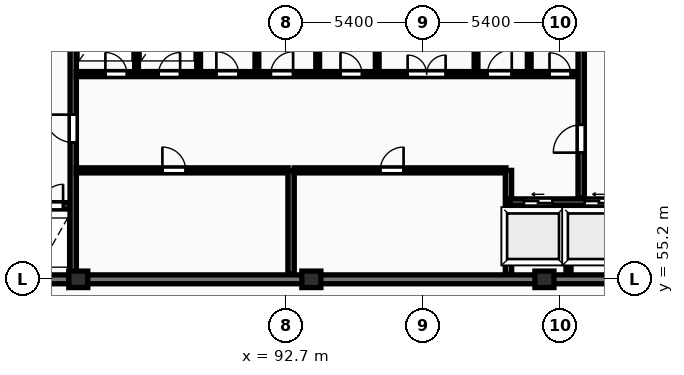
"""IFC4 building model, lengths in metres.
Left out: names, types, materials, properties, quantities, classifications, styles, units other than length and angle.
Written with IfcOpenShell. Run it as: python <this file> out.ifc"""

import sys

from ifc_helpers import new_model, si_unit, direction, frame, frame_2d, origin, origin_2d, place, context, subcontext, project, spatial, rectangle, extrude, element, fill, save


model = new_model("IFC4")
c1 = context("Model", 3, precision=1e-05, world=origin(), true_north=direction((0.0, 1.0)))
c2 = subcontext(c1, "Body", "Model", "MODEL_VIEW")
j1 = project(units=[si_unit("LENGTHUNIT", "METRE"), si_unit("PLANEANGLEUNIT", "RADIAN")], contexts=[c1])
p1 = place(None, origin())
s1 = spatial("IfcSite", under=j1, at=p1, CompositionType="ELEMENT")
p2 = place(p1, origin())
s2 = spatial("IfcBuilding", under=s1, at=p2, CompositionType="ELEMENT")
p3 = place(p2, frame((0.0, 0.0, 242.45)))
s3 = spatial("IfcBuildingStorey", under=s2, at=p3, CompositionType="ELEMENT", Elevation=242.45)
for number, where, z_axis, x_axis in (
    (1, (84.5, 55.2, 0.0), (0.0, 0.0, 1.0), (1.0, 0.0, 0.0)),
    (2, (93.7, 55.2, 0.0), (0.0, 0.0, 1.0), (1.0, 0.0, 0.0)),
    (3, (102.9, 55.2, 0.0), (0.0, 0.0, 1.0), (1.0, 0.0, 0.0)),
):
    element("IfcColumn", number, at=place(p3, frame(where, z_axis=z_axis, x_axis=x_axis)), inside=s3, PredefinedType="COLUMN", context=c2, shape_type="SweptSolid", body=[
        extrude(rectangle(XDim=0.75, YDim=0.65, at=origin_2d()), origin(), (0.0, 0.0, 1.0), 3.45),
    ])
p4 = place(p3, frame((75.95, 55.2, 0.0), z_axis=(0.0, 0.0, 1.0), x_axis=(1.0, 0.0, 0.0)))
e4 = element("IfcWall", 4, at=p4, inside=s3, PredefinedType="SHEAR", context=c2, shape_type="SweptSolid", body=[
    extrude(rectangle(XDim=36.3, YDim=0.35, at=frame_2d((18.15, 0.0))), origin(), (0.0, 0.0, 1.0), 3.45),
])
p5 = place(p3, frame((79.79, 58.1, 0.0), z_axis=(0.0, 0.0, 1.0), x_axis=(1.0, 0.0, 0.0)))
e5 = element("IfcWall", 5, at=p5, inside=s3, PredefinedType="SHEAR", context=c2, shape_type="SweptSolid", body=[
    extrude(rectangle(XDim=4.39, YDim=0.25, at=frame_2d((2.195, 0.0))), origin(), (0.0, 0.0, 1.0), 3.45),
])
p6 = place(p5, frame((1.05, 0.0, 0.0)))
e6 = element("IfcOpeningElement", 6, at=p6, cuts=e5, PredefinedType="OPENING", context=c2, shape_type="SweptSolid", body=[
    extrude(rectangle(XDim=1.12, YDim=2.12, at=frame_2d((0.56, 1.06))), frame((0.0, 0.135, 0.0), z_axis=(0.0, -1.0, 0.0), x_axis=(1.0, 0.0, 0.0)), (0.0, 0.0, 1.0), 0.27),
])
p7 = place(p5, frame((3.26, 0.0, 0.0)))
e7 = element("IfcOpeningElement", 7, at=p7, cuts=e5, PredefinedType="OPENING", context=c2, shape_type="SweptSolid", body=[
    extrude(rectangle(XDim=0.85, YDim=2.05, at=frame_2d((0.425, 1.025))), frame((0.0, 0.135, 0.0), z_axis=(0.0, -1.0, 0.0), x_axis=(1.0, 0.0, 0.0)), (0.0, 0.0, 1.0), 0.27),
])
p8 = place(p3, frame((84.3, 55.4, 0.0), z_axis=(0.0, 0.0, 1.0), x_axis=(0.0, 1.0, 0.0)))
e8 = element("IfcWall", 8, at=p8, inside=s3, PredefinedType="SHEAR", context=c2, shape_type="SweptSolid", body=[
    extrude(rectangle(XDim=11.6, YDim=0.25, at=frame_2d((5.8, 0.0))), origin(), (0.0, 0.0, 1.0), 3.45),
])
p9 = place(p8, frame((5.2, 0.0, 0.0)))
e9 = element("IfcOpeningElement", 9, at=p9, cuts=e8, PredefinedType="OPENING", context=c2, shape_type="SweptSolid", body=[
    extrude(rectangle(XDim=1.1, YDim=2.1, at=frame_2d((0.55, 1.05))), frame((0.0, 0.135, 0.0), z_axis=(0.0, -1.0, 0.0), x_axis=(1.0, 0.0, 0.0)), (0.0, 0.0, 1.0), 0.27),
])
p10 = place(p3, frame((84.42, 59.5, 0.0), z_axis=(0.0, 0.0, 1.0), x_axis=(1.0, 0.0, 0.0)))
e10 = element("IfcWall", 10, at=p10, inside=s3, PredefinedType="PARTITIONING", context=c2, shape_type="SweptSolid", body=[
    extrude(rectangle(XDim=8.36, YDim=0.2, at=frame_2d((4.18, 0.0))), origin(), (0.0, 0.0, 1.0), 3.17),
])
p11 = place(p10, frame((3.4, 0.0, 0.0)))
e11 = element("IfcOpeningElement", 11, at=p11, cuts=e10, PredefinedType="OPENING", context=c2, shape_type="SweptSolid", body=[
    extrude(rectangle(XDim=0.92, YDim=2.08, at=frame_2d((0.46, 1.04))), frame((0.0, 0.11, 0.0), z_axis=(0.0, -1.0, 0.0), x_axis=(1.0, 0.0, 0.0)), (0.0, 0.0, 1.0), 0.22),
])
p12 = place(p3, frame((92.9, 55.4, 0.0), z_axis=(0.0, 0.0, 1.0), x_axis=(0.0, 1.0, 0.0)))
e12 = element("IfcWall", 12, at=p12, inside=s3, PredefinedType="SHEAR", context=c2, shape_type="SweptSolid", body=[
    extrude(rectangle(XDim=4.1, YDim=0.25, at=frame_2d((2.05, 0.0))), origin(), (0.0, 0.0, 1.0), 3.45),
])
p13 = place(p3, frame((93.02, 59.5, 0.0), z_axis=(0.0, 0.0, 1.0), x_axis=(1.0, 0.0, 0.0)))
e13 = element("IfcWall", 13, at=p13, inside=s3, PredefinedType="PARTITIONING", context=c2, shape_type="SweptSolid", body=[
    extrude(rectangle(XDim=8.36, YDim=0.2, at=frame_2d((4.18, 0.0))), origin(), (0.0, 0.0, 1.0), 3.17),
])
p14 = place(p13, frame((3.4, 0.0, 0.0)))
e14 = element("IfcOpeningElement", 14, at=p14, cuts=e13, PredefinedType="OPENING", context=c2, shape_type="SweptSolid", body=[
    extrude(rectangle(XDim=0.92, YDim=2.08, at=frame_2d((0.46, 1.04))), frame((0.0, 0.11, 0.0), z_axis=(0.0, -1.0, 0.0), x_axis=(1.0, 0.0, 0.0)), (0.0, 0.0, 1.0), 0.22),
])
p15 = place(p3, frame((101.48, 55.4, 0.0), z_axis=(0.0, 0.0, 1.0), x_axis=(0.0, 1.0, 0.0)))
e15 = element("IfcWall", 15, at=p15, inside=s3, PredefinedType="SHEAR", context=c2, shape_type="SweptSolid", body=[
    extrude(rectangle(XDim=4.1, YDim=0.25, at=frame_2d((2.05, 0.0))), origin(), (0.0, 0.0, 1.0), 3.45),
])
p16 = place(p3, frame((103.85, 55.4, 0.0), z_axis=(0.0, 0.0, 1.0), x_axis=(0.0, 1.0, 0.0)))
e16 = element("IfcWall", 16, at=p16, inside=s3, PredefinedType="PARTITIONING", context=c2, shape_type="SweptSolid", body=[
    extrude(rectangle(XDim=2.72, YDim=0.2, at=frame_2d((1.36, 0.0))), origin(), (0.0, 0.0, 1.0), 3.17),
])
p17 = place(p3, frame((101.55, 58.25, 0.0), z_axis=(0.0, 0.0, 1.0), x_axis=(1.0, 0.0, 0.0)))
e17 = element("IfcWall", 17, at=p17, inside=s3, PredefinedType="SHEAR", context=c2, shape_type="SweptSolid", body=[
    extrude(rectangle(XDim=4.6, YDim=0.25, at=frame_2d((2.3, 0.0))), origin(), (0.0, 0.0, 1.0), 3.45),
])
p18 = place(p17, frame((0.54, 0.0, 0.0)))
e18 = element("IfcOpeningElement", 18, at=p18, cuts=e17, PredefinedType="OPENING", context=c2, shape_type="SweptSolid", body=[
    extrude(rectangle(XDim=1.12, YDim=2.12, at=frame_2d((0.56, 1.06))), frame((0.0, 0.135, 0.0), z_axis=(0.0, -1.0, 0.0), x_axis=(1.0, 0.0, 0.0)), (0.0, 0.0, 1.0), 0.27),
])
p19 = place(p17, frame((2.94, 0.0, 0.0)))
e19 = element("IfcOpeningElement", 19, at=p19, cuts=e17, PredefinedType="OPENING", context=c2, shape_type="SweptSolid", body=[
    extrude(rectangle(XDim=1.12, YDim=2.12, at=frame_2d((0.56, 1.06))), frame((0.0, 0.135, 0.0), z_axis=(0.0, -1.0, 0.0), x_axis=(1.0, 0.0, 0.0)), (0.0, 0.0, 1.0), 0.27),
])
for number, where, z_axis, x_axis in (
    (20, (86.8, 63.4, 0.0), (0.0, 0.0, 1.0), (0.0, 1.0, 0.0)),
    (21, (89.25, 63.4, 0.0), (0.0, 0.0, 1.0), (0.0, 1.0, 0.0)),
    (22, (91.55, 63.4, 0.0), (0.0, 0.0, 1.0), (0.0, 1.0, 0.0)),
):
    element("IfcWall", number, at=place(p3, frame(where, z_axis=z_axis, x_axis=x_axis)), inside=s3, PredefinedType="PARTITIONING", context=c2, shape_type="SweptSolid", body=[
        extrude(rectangle(XDim=3.6, YDim=0.15, at=frame_2d((1.8, 0.0))), origin(), (0.0, 0.0, 1.0), 3.17),
    ])
p20 = place(p3, frame((93.95, 63.4, 0.0), z_axis=(0.0, 0.0, 1.0), x_axis=(0.0, 1.0, 0.0)))
e23 = element("IfcWall", 23, at=p20, inside=s3, PredefinedType="PARTITIONING", context=c2, shape_type="SweptSolid", body=[
    extrude(rectangle(XDim=3.6, YDim=0.15, at=frame_2d((1.8, 0.0))), origin(), (0.0, 0.0, 1.0), 2.477),
])
for number, where, z_axis, x_axis in (
    (24, (102.3, 63.4, 0.0), (0.0, 0.0, 1.0), (0.0, 1.0, 0.0)),
    (25, (96.3, 63.4, 0.0), (0.0, 0.0, 1.0), (0.0, 1.0, 0.0)),
    (26, (100.2, 63.4, 0.0), (0.0, 0.0, 1.0), (0.0, 1.0, 0.0)),
):
    element("IfcWall", number, at=place(p3, frame(where, z_axis=z_axis, x_axis=x_axis)), inside=s3, PredefinedType="PARTITIONING", context=c2, shape_type="SweptSolid", body=[
        extrude(rectangle(XDim=3.6, YDim=0.15, at=frame_2d((1.8, 0.0))), origin(), (0.0, 0.0, 1.0), 3.17),
    ])
p21 = place(p3, frame((84.42, 63.3, 0.0), z_axis=(0.0, 0.0, 1.0), x_axis=(1.0, 0.0, 0.0)))
e27 = element("IfcWall", 27, at=p21, inside=s3, PredefinedType="PARTITIONING", context=c2, shape_type="SweptSolid", body=[
    extrude(rectangle(XDim=19.83, YDim=0.2, at=frame_2d((9.915, 0.0))), origin(), (0.0, 0.0, 1.0), 3.17),
])
p22 = place(p21, frame((1.15, 0.0, 0.0)))
e28 = element("IfcOpeningElement", 28, at=p22, cuts=e27, PredefinedType="OPENING", context=c2, shape_type="SweptSolid", body=[
    extrude(rectangle(XDim=0.85, YDim=2.05, at=frame_2d((0.425, 1.025))), frame((0.0, 0.11, 0.0), z_axis=(0.0, -1.0, 0.0), x_axis=(1.0, 0.0, 0.0)), (0.0, 0.0, 1.0), 0.22),
])
p23 = place(p21, frame((3.25, 0.0, 0.0)))
e29 = element("IfcOpeningElement", 29, at=p23, cuts=e27, PredefinedType="OPENING", context=c2, shape_type="SweptSolid", body=[
    extrude(rectangle(XDim=0.85, YDim=2.05, at=frame_2d((0.425, 1.025))), frame((0.0, 0.11, 0.0), z_axis=(0.0, -1.0, 0.0), x_axis=(1.0, 0.0, 0.0)), (0.0, 0.0, 1.0), 0.22),
])
p24 = place(p21, frame((13.08, 0.0, 0.0)))
e30 = element("IfcOpeningElement", 30, at=p24, cuts=e27, PredefinedType="OPENING", context=c2, shape_type="SweptSolid", body=[
    extrude(rectangle(XDim=1.5, YDim=2.2, at=frame_2d((0.75, 1.1))), frame((0.0, 0.11, 0.0), z_axis=(0.0, -1.0, 0.0), x_axis=(1.0, 0.0, 0.0)), (0.0, 0.0, 1.0), 0.22),
])
p25 = place(p21, frame((5.53, 0.0, 0.0)))
e31 = element("IfcOpeningElement", 31, at=p25, cuts=e27, PredefinedType="OPENING", context=c2, shape_type="SweptSolid", body=[
    extrude(rectangle(XDim=0.88, YDim=2.06, at=frame_2d((0.44, 1.03))), frame((0.0, 0.11, 0.0), z_axis=(0.0, -1.0, 0.0), x_axis=(1.0, 0.0, 0.0)), (0.0, 0.0, 1.0), 0.22),
])
p26 = place(p21, frame((7.68, 0.0, 0.0)))
e32 = element("IfcOpeningElement", 32, at=p26, cuts=e27, PredefinedType="OPENING", context=c2, shape_type="SweptSolid", body=[
    extrude(rectangle(XDim=0.88, YDim=2.06, at=frame_2d((0.44, 1.03))), frame((0.0, 0.11, 0.0), z_axis=(0.0, -1.0, 0.0), x_axis=(1.0, 0.0, 0.0)), (0.0, 0.0, 1.0), 0.22),
])
p27 = place(p21, frame((10.43, 0.0, 0.0)))
e33 = element("IfcOpeningElement", 33, at=p27, cuts=e27, PredefinedType="OPENING", context=c2, shape_type="SweptSolid", body=[
    extrude(rectangle(XDim=0.85, YDim=2.05, at=frame_2d((0.425, 1.025))), frame((0.0, 0.11, 0.0), z_axis=(0.0, -1.0, 0.0), x_axis=(1.0, 0.0, 0.0)), (0.0, 0.0, 1.0), 0.22),
])
p28 = place(p21, frame((16.23, 0.0, 0.0)))
e34 = element("IfcOpeningElement", 34, at=p28, cuts=e27, PredefinedType="OPENING", context=c2, shape_type="SweptSolid", body=[
    extrude(rectangle(XDim=0.96, YDim=2.1, at=frame_2d((0.48, 1.05))), frame((0.0, 0.11, 0.0), z_axis=(0.0, -1.0, 0.0), x_axis=(1.0, 0.0, 0.0)), (0.0, 0.0, 1.0), 0.22),
])
p29 = place(p21, frame((18.68, 0.0, 0.0)))
e35 = element("IfcOpeningElement", 35, at=p29, cuts=e27, PredefinedType="OPENING", context=c2, shape_type="SweptSolid", body=[
    extrude(rectangle(XDim=0.84, YDim=2.04, at=frame_2d((0.42, 1.02))), frame((0.0, 0.11, 0.0), z_axis=(0.0, -1.0, 0.0), x_axis=(1.0, 0.0, 0.0)), (0.0, 0.0, 1.0), 0.22),
])
p30 = place(p3, frame((104.35, 58.4, 0.0), z_axis=(0.0, 0.0, 1.0), x_axis=(0.0, 1.0, 0.0)))
e36 = element("IfcWall", 36, at=p30, inside=s3, PredefinedType="SHEAR", context=c2, shape_type="SweptSolid", body=[
    extrude(rectangle(XDim=8.6, YDim=0.25, at=frame_2d((4.3, 0.0))), origin(), (0.0, 0.0, 1.0), 3.45),
])
p31 = place(p30, frame((1.8, 0.0, 0.0)))
e37 = element("IfcOpeningElement", 37, at=p31, cuts=e36, PredefinedType="OPENING", context=c2, shape_type="SweptSolid", body=[
    extrude(rectangle(XDim=1.1, YDim=2.1, at=frame_2d((0.55, 1.05))), frame((0.0, 0.135, 0.0), z_axis=(0.0, -1.0, 0.0), x_axis=(1.0, 0.0, 0.0)), (0.0, 0.0, 1.0), 0.27),
])
p32 = place(p7, origin())
e38 = element("IfcDoor", 38, at=p32, inside=s3, OperationType="SINGLE_SWING_RIGHT", PredefinedType="DOOR", context=c2, shape_type="SweptSolid", body=[
    extrude(rectangle(XDim=0.85, YDim=2.05, at=frame_2d((0.425, 1.025))), frame((0.0, 0.025, 0.0), z_axis=(0.0, -1.0, 0.0), x_axis=(1.0, 0.0, 0.0)), (0.0, 0.0, 1.0), 0.05),
])
fill(e7, e38)
p33 = place(p9, origin())
e39 = element("IfcDoor", 39, at=p33, inside=s3, OperationType="SINGLE_SWING_RIGHT", PredefinedType="DOOR", context=c2, shape_type="SweptSolid", body=[
    extrude(rectangle(XDim=1.1, YDim=2.1, at=frame_2d((0.55, 1.05))), frame((0.0, 0.025, 0.0), z_axis=(0.0, -1.0, 0.0), x_axis=(1.0, 0.0, 0.0)), (0.0, 0.0, 1.0), 0.05),
])
fill(e9, e39)
p34 = place(p11, origin())
e40 = element("IfcDoor", 40, at=p34, inside=s3, OperationType="SINGLE_SWING_LEFT", PredefinedType="DOOR", context=c2, shape_type="SweptSolid", body=[
    extrude(rectangle(XDim=0.92, YDim=2.08, at=frame_2d((0.46, 1.04))), frame((0.0, 0.025, 0.0), z_axis=(0.0, -1.0, 0.0), x_axis=(1.0, 0.0, 0.0)), (0.0, 0.0, 1.0), 0.05),
])
fill(e11, e40)
p35 = place(p14, origin())
e41 = element("IfcDoor", 41, at=p35, inside=s3, OperationType="SINGLE_SWING_RIGHT", PredefinedType="DOOR", context=c2, shape_type="SweptSolid", body=[
    extrude(rectangle(XDim=0.92, YDim=2.08, at=frame_2d((0.46, 1.04))), frame((0.0, 0.025, 0.0), z_axis=(0.0, -1.0, 0.0), x_axis=(1.0, 0.0, 0.0)), (0.0, 0.0, 1.0), 0.05),
])
fill(e14, e41)
p36 = place(p18, origin())
e42 = element("IfcDoor", 42, at=p36, inside=s3, OperationType="SLIDING_TO_LEFT", PredefinedType="DOOR", context=c2, shape_type="SweptSolid", body=[
    extrude(rectangle(XDim=1.12, YDim=2.12, at=frame_2d((0.56, 1.06))), frame((0.0, 0.025, 0.0), z_axis=(0.0, -1.0, 0.0), x_axis=(1.0, 0.0, 0.0)), (0.0, 0.0, 1.0), 0.05),
])
fill(e18, e42)
p37 = place(p19, origin())
e43 = element("IfcDoor", 43, at=p37, inside=s3, OperationType="SLIDING_TO_LEFT", PredefinedType="DOOR", context=c2, shape_type="SweptSolid", body=[
    extrude(rectangle(XDim=1.12, YDim=2.12, at=frame_2d((0.56, 1.06))), frame((0.0, 0.025, 0.0), z_axis=(0.0, -1.0, 0.0), x_axis=(1.0, 0.0, 0.0)), (0.0, 0.0, 1.0), 0.05),
])
fill(e19, e43)
p38 = place(p22, origin())
e44 = element("IfcDoor", 44, at=p38, inside=s3, OperationType="SINGLE_SWING_LEFT", PredefinedType="DOOR", context=c2, shape_type="SweptSolid", body=[
    extrude(rectangle(XDim=0.85, YDim=2.05, at=frame_2d((0.425, 1.025))), frame((0.0, 0.025, 0.0), z_axis=(0.0, -1.0, 0.0), x_axis=(1.0, 0.0, 0.0)), (0.0, 0.0, 1.0), 0.05),
])
fill(e28, e44)
p39 = place(p23, origin())
e45 = element("IfcDoor", 45, at=p39, inside=s3, OperationType="SINGLE_SWING_RIGHT", PredefinedType="DOOR", context=c2, shape_type="SweptSolid", body=[
    extrude(rectangle(XDim=0.85, YDim=2.05, at=frame_2d((0.425, 1.025))), frame((0.0, 0.025, 0.0), z_axis=(0.0, -1.0, 0.0), x_axis=(1.0, 0.0, 0.0)), (0.0, 0.0, 1.0), 0.05),
])
fill(e29, e45)
p40 = place(p24, origin())
e46 = element("IfcDoor", 46, at=p40, inside=s3, OperationType="DOUBLE_DOOR_SINGLE_SWING", PredefinedType="DOOR", context=c2, shape_type="SweptSolid", body=[
    extrude(rectangle(XDim=1.5, YDim=2.2, at=frame_2d((0.75, 1.1))), frame((0.0, 0.025, 0.0), z_axis=(0.0, -1.0, 0.0), x_axis=(1.0, 0.0, 0.0)), (0.0, 0.0, 1.0), 0.05),
])
fill(e30, e46)
p41 = place(p25, origin())
e47 = element("IfcDoor", 47, at=p41, inside=s3, OperationType="SINGLE_SWING_LEFT", PredefinedType="DOOR", context=c2, shape_type="SweptSolid", body=[
    extrude(rectangle(XDim=0.88, YDim=2.06, at=frame_2d((0.44, 1.03))), frame((0.0, 0.025, 0.0), z_axis=(0.0, -1.0, 0.0), x_axis=(1.0, 0.0, 0.0)), (0.0, 0.0, 1.0), 0.05),
])
fill(e31, e47)
p42 = place(p26, origin())
e48 = element("IfcDoor", 48, at=p42, inside=s3, OperationType="SINGLE_SWING_RIGHT", PredefinedType="DOOR", context=c2, shape_type="SweptSolid", body=[
    extrude(rectangle(XDim=0.88, YDim=2.06, at=frame_2d((0.44, 1.03))), frame((0.0, 0.025, 0.0), z_axis=(0.0, -1.0, 0.0), x_axis=(1.0, 0.0, 0.0)), (0.0, 0.0, 1.0), 0.05),
])
fill(e32, e48)
p43 = place(p27, origin())
e49 = element("IfcDoor", 49, at=p43, inside=s3, OperationType="SINGLE_SWING_LEFT", PredefinedType="DOOR", context=c2, shape_type="SweptSolid", body=[
    extrude(rectangle(XDim=0.85, YDim=2.05, at=frame_2d((0.425, 1.025))), frame((0.0, 0.025, 0.0), z_axis=(0.0, -1.0, 0.0), x_axis=(1.0, 0.0, 0.0)), (0.0, 0.0, 1.0), 0.05),
])
fill(e33, e49)
p44 = place(p28, origin())
e50 = element("IfcDoor", 50, at=p44, inside=s3, OperationType="SINGLE_SWING_RIGHT", PredefinedType="DOOR", context=c2, shape_type="SweptSolid", body=[
    extrude(rectangle(XDim=0.96, YDim=2.1, at=frame_2d((0.48, 1.05))), frame((0.0, 0.025, 0.0), z_axis=(0.0, -1.0, 0.0), x_axis=(1.0, 0.0, 0.0)), (0.0, 0.0, 1.0), 0.05),
])
fill(e34, e50)
p45 = place(p29, origin())
e51 = element("IfcDoor", 51, at=p45, inside=s3, OperationType="SINGLE_SWING_LEFT", PredefinedType="DOOR", context=c2, shape_type="SweptSolid", body=[
    extrude(rectangle(XDim=0.84, YDim=2.04, at=frame_2d((0.42, 1.02))), frame((0.0, 0.025, 0.0), z_axis=(0.0, -1.0, 0.0), x_axis=(1.0, 0.0, 0.0)), (0.0, 0.0, 1.0), 0.05),
])
fill(e35, e51)
p46 = place(p31, origin())
e52 = element("IfcDoor", 52, at=p46, inside=s3, OperationType="SINGLE_SWING_LEFT", PredefinedType="DOOR", context=c2, shape_type="SweptSolid", body=[
    extrude(rectangle(XDim=1.1, YDim=2.1, at=frame_2d((0.55, 1.05))), frame((0.0, 0.025, 0.0), z_axis=(0.0, -1.0, 0.0), x_axis=(1.0, 0.0, 0.0)), (0.0, 0.0, 1.0), 0.05),
])
fill(e37, e52)
save(model, sys.argv[1])
